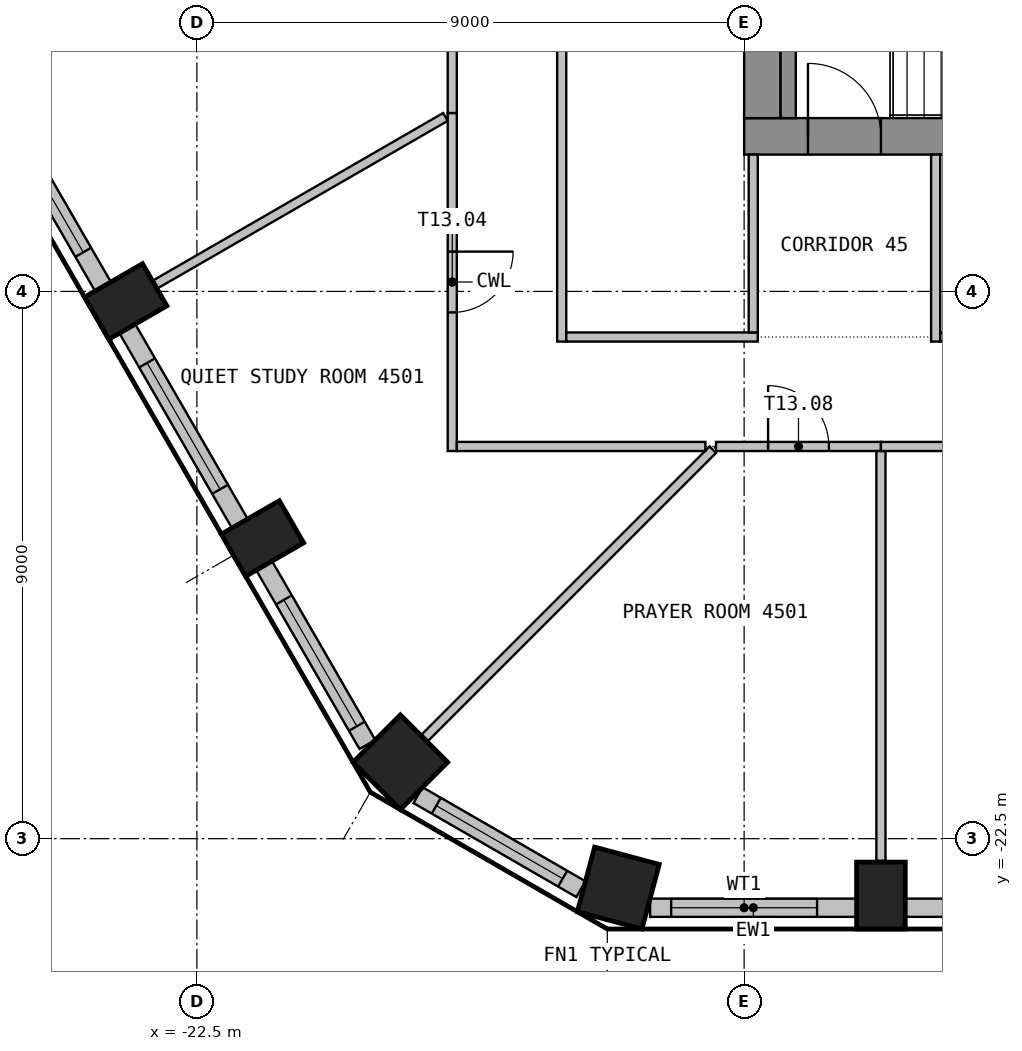
"""IFC4 building model, lengths in metres.
Left out: names, types, materials, properties, quantities, classifications, styles, units other than length and angle.
Written with IfcOpenShell. Run it as: python <this file> out.ifc"""

import sys

from ifc_helpers import new_model, si_unit, direction, frame, frame_2d, origin, origin_2d, place, context, subcontext, project, spatial, rectangle, extrude, element, fill, save


model = new_model("IFC4")
c1 = context("Model", 3, precision=1e-05, world=origin(), true_north=direction((0.0, 1.0)))
c2 = subcontext(c1, "Body", "Model", "MODEL_VIEW")
j1 = project(units=[si_unit("LENGTHUNIT", "METRE"), si_unit("PLANEANGLEUNIT", "RADIAN")], contexts=[c1])
p1 = place(None, origin())
s1 = spatial("IfcSite", under=j1, at=p1, CompositionType="ELEMENT")
p2 = place(p1, origin())
s2 = spatial("IfcBuilding", under=s1, at=p2, CompositionType="ELEMENT")
p3 = place(p2, frame((0.0, 0.0, 183.9)))
s3 = spatial("IfcBuildingStorey", under=s2, at=p3, CompositionType="ELEMENT", Elevation=183.9)
p4 = place(p3, frame((-15.57, -23.312, 0.0), z_axis=(0.0, 0.0, 1.0), x_axis=(0.965925826289, -0.258819045103, 0.0)))
e1 = element("IfcColumn", 1, at=p4, inside=s3, PredefinedType="COLUMN", context=c2, shape_type="SweptSolid", body=[
    extrude(rectangle(XDim=1.1, YDim=1.1, at=origin_2d()), origin(), (0.0, 0.0, 1.0), 3.55),
])
for number, where, z_axis, x_axis in (
    (2, (-11.25, -23.436, 0.0), (0.0, 0.0, 1.0), (1.0, 0.0, 0.0)),
    (3, (-23.671, -13.666, 0.0), (0.0, 0.0, 1.0), (0.5, -0.866, 0.0)),
    (4, (-21.421, -17.563, 0.0), (0.0, 0.0, 1.0), (0.5, -0.866, 0.0)),
):
    element("IfcColumn", number, at=place(p3, frame(where, z_axis=z_axis, x_axis=x_axis)), inside=s3, PredefinedType="COLUMN", context=c2, shape_type="SweptSolid", body=[
        extrude(rectangle(XDim=0.8, YDim=1.1, at=origin_2d()), origin(), (0.0, 0.0, 1.0), 3.55),
    ])
p5 = place(p3, frame((-19.154, -21.242, 0.0), z_axis=(0.0, 0.0, 1.0), x_axis=(0.707106781187, -0.707106781187, 0.0)))
e5 = element("IfcColumn", 5, at=p5, inside=s3, PredefinedType="COLUMN", context=c2, shape_type="SweptSolid", body=[
    extrude(rectangle(XDim=1.1, YDim=1.1, at=origin_2d()), origin(), (0.0, 0.0, 1.0), 3.55),
])
p6 = place(p3, frame((-15.046, -23.635, 0.0), z_axis=(0.0, 0.0, 1.0), x_axis=(1.0, 0.0, 0.0)))
e6 = element("IfcWall", 6, at=p6, inside=s3, PredefinedType="SOLIDWALL", context=c2, shape_type="SweptSolid", body=[
    extrude(rectangle(XDim=3.396, YDim=0.3, at=frame_2d((1.698, 0.0))), origin(), (0.0, 0.0, 1.0), 3.55),
])
p7 = place(p6, frame((0.346, 0.0, 0.9)))
e7 = element("IfcOpeningElement", 7, at=p7, cuts=e6, PredefinedType="OPENING", context=c2, shape_type="SweptSolid", body=[
    extrude(rectangle(XDim=2.4, YDim=2.1, at=frame_2d((1.2, 1.05))), frame((0.0, 0.16, 0.0), z_axis=(0.0, -1.0, 0.0), x_axis=(1.0, 0.0, 0.0)), (0.0, 0.0, 1.0), 0.32),
])
p8 = place(p3, frame((-10.85, -23.635, 0.0), z_axis=(0.0, 0.0, 1.0), x_axis=(1.0, 0.0, 0.0)))
e8 = element("IfcWall", 8, at=p8, inside=s3, PredefinedType="SOLIDWALL", context=c2, shape_type="SweptSolid", body=[
    extrude(rectangle(XDim=3.699, YDim=0.3, at=frame_2d((1.85, 0.0))), origin(), (0.0, 0.0, 1.0), 3.55),
])
p9 = place(p8, frame((0.649, 0.0, 0.9)))
e9 = element("IfcOpeningElement", 9, at=p9, cuts=e8, PredefinedType="OPENING", context=c2, shape_type="SweptSolid", body=[
    extrude(rectangle(XDim=2.4, YDim=2.1, at=frame_2d((1.2, 1.05))), frame((0.0, 0.16, 0.0), z_axis=(0.0, -1.0, 0.0), x_axis=(1.0, 0.0, 0.0)), (0.0, 0.0, 1.0), 0.32),
])
p10 = place(p3, frame((-25.894, -10.216, 0.0), z_axis=(0.0, 0.0, 1.0), x_axis=(0.500029062817, -0.866008623709, 0.0)))
e10 = element("IfcWall", 10, at=p10, inside=s3, PredefinedType="SOLIDWALL", context=c2, shape_type="SweptSolid", body=[
    extrude(rectangle(XDim=3.699, YDim=0.3, at=frame_2d((1.85, 0.0))), origin(), (0.0, 0.0, 1.0), 3.55),
])
p11 = place(p10, frame((0.649, 0.0, 0.9)))
e11 = element("IfcOpeningElement", 11, at=p11, cuts=e10, PredefinedType="OPENING", context=c2, shape_type="SweptSolid", body=[
    extrude(rectangle(XDim=2.4, YDim=2.1, at=frame_2d((1.2, 1.05))), frame((0.0, 0.16, 0.0), z_axis=(0.0, -1.0, 0.0), x_axis=(1.0, 0.0, 0.0)), (0.0, 0.0, 1.0), 0.32),
])
p12 = place(p3, frame((-23.644, -14.113, 0.0), z_axis=(0.0, 0.0, 1.0), x_axis=(0.500029062817, -0.866008623709, 0.0)))
e12 = element("IfcWall", 12, at=p12, inside=s3, PredefinedType="SOLIDWALL", context=c2, shape_type="SweptSolid", body=[
    extrude(rectangle(XDim=3.699, YDim=0.3, at=frame_2d((1.85, 0.0))), origin(), (0.0, 0.0, 1.0), 3.55),
])
p13 = place(p12, frame((0.649, 0.0, 0.9)))
e13 = element("IfcOpeningElement", 13, at=p13, cuts=e12, PredefinedType="OPENING", context=c2, shape_type="SweptSolid", body=[
    extrude(rectangle(XDim=2.4, YDim=2.1, at=frame_2d((1.2, 1.05))), frame((0.0, 0.16, 0.0), z_axis=(0.0, -1.0, 0.0), x_axis=(1.0, 0.0, 0.0)), (0.0, 0.0, 1.0), 0.32),
])
p14 = place(p3, frame((-21.394, -18.01, 0.0), z_axis=(0.0, 0.0, 1.0), x_axis=(0.500012868213, -0.866017974191, 0.0)))
e14 = element("IfcWall", 14, at=p14, inside=s3, PredefinedType="SOLIDWALL", context=c2, shape_type="SweptSolid", body=[
    extrude(rectangle(XDim=3.396, YDim=0.3, at=frame_2d((1.698, 0.0))), origin(), (0.0, 0.0, 1.0), 3.55),
])
p15 = place(p14, frame((0.649, 0.0, 0.9)))
e15 = element("IfcOpeningElement", 15, at=p15, cuts=e14, PredefinedType="OPENING", context=c2, shape_type="SweptSolid", body=[
    extrude(rectangle(XDim=2.4, YDim=2.1, at=frame_2d((1.2, 1.05))), frame((0.0, 0.16, 0.0), z_axis=(0.0, -1.0, 0.0), x_axis=(1.0, 0.0, 0.0)), (0.0, 0.0, 1.0), 0.32),
])
p16 = place(p3, frame((-18.863, -21.784, 0.0), z_axis=(0.0, 0.0, 1.0), x_axis=(0.865994975416, -0.500052699777, 0.0)))
e16 = element("IfcWall", 16, at=p16, inside=s3, PredefinedType="SOLIDWALL", context=c2, shape_type="SweptSolid", body=[
    extrude(rectangle(XDim=3.093, YDim=0.3, at=frame_2d((1.546, 0.0))), origin(), (0.0, 0.0, 1.0), 3.55),
])
p17 = place(p16, frame((0.346, 0.0, 0.9)))
e17 = element("IfcOpeningElement", 17, at=p17, cuts=e16, PredefinedType="OPENING", context=c2, shape_type="SweptSolid", body=[
    extrude(rectangle(XDim=2.4, YDim=2.1, at=frame_2d((1.2, 1.05))), frame((0.0, 0.16, 0.0), z_axis=(0.0, -1.0, 0.0), x_axis=(1.0, 0.0, 0.0)), (0.0, 0.0, 1.0), 0.32),
])
p18 = place(p3, frame((-13.5, -10.95, 0.0), z_axis=(0.0, 0.0, 1.0), x_axis=(1.0, 0.0, 0.0)))
e18 = element("IfcWall", 18, at=p18, inside=s3, PredefinedType="SHEAR", context=c2, shape_type="SweptSolid", body=[
    extrude(rectangle(XDim=27.0, YDim=0.6, at=frame_2d((13.5, 0.0))), origin(), (0.0, 0.0, 1.0), 3.55),
])
p19 = place(p18, frame((12.3, 0.0, 0.0)))
e19 = element("IfcOpeningElement", 19, at=p19, cuts=e18, PredefinedType="OPENING", context=c2, shape_type="SweptSolid", body=[
    extrude(rectangle(XDim=2.4, YDim=2.1, at=frame_2d((1.2, 1.05))), frame((0.0, 0.31, 0.0), z_axis=(0.0, -1.0, 0.0), x_axis=(1.0, 0.0, 0.0)), (0.0, 0.0, 1.0), 0.62),
])
p20 = place(p18, frame((1.05, 0.0, 0.0)))
e20 = element("IfcOpeningElement", 20, at=p20, cuts=e18, PredefinedType="OPENING", context=c2, shape_type="SweptSolid", body=[
    extrude(rectangle(XDim=1.2, YDim=2.1, at=frame_2d((0.6, 1.05))), frame((0.0, 0.31, 0.0), z_axis=(0.0, -1.0, 0.0), x_axis=(1.0, 0.0, 0.0)), (0.0, 0.0, 1.0), 0.62),
])
p21 = place(p18, frame((24.75, 0.0, 0.0)))
e21 = element("IfcOpeningElement", 21, at=p21, cuts=e18, PredefinedType="OPENING", context=c2, shape_type="SweptSolid", body=[
    extrude(rectangle(XDim=1.2, YDim=2.1, at=frame_2d((0.6, 1.05))), frame((0.0, 0.31, 0.0), z_axis=(0.0, -1.0, 0.0), x_axis=(1.0, 0.0, 0.0)), (0.0, 0.0, 1.0), 0.62),
])
p22 = place(p3, frame((-13.2, -10.65, 0.0), z_axis=(0.0, 0.0, 1.0), x_axis=(0.0, 1.0, 0.0)))
e22 = element("IfcWall", 22, at=p22, inside=s3, PredefinedType="SHEAR", context=c2, shape_type="SweptSolid", body=[
    extrude(rectangle(XDim=21.3, YDim=0.6, at=frame_2d((10.65, 0.0))), origin(), (0.0, 0.0, 1.0), 3.55),
])
p23 = place(p22, frame((9.45, 0.0, 0.0)))
e23 = element("IfcOpeningElement", 23, at=p23, cuts=e22, PredefinedType="OPENING", context=c2, shape_type="SweptSolid", body=[
    extrude(rectangle(XDim=2.4, YDim=2.1, at=frame_2d((1.2, 1.05))), frame((0.0, 0.31, 0.0), z_axis=(0.0, -1.0, 0.0), x_axis=(1.0, 0.0, 0.0)), (0.0, 0.0, 1.0), 0.62),
])
p24 = place(p3, frame((-12.775, -10.65, 0.0), z_axis=(0.0, 0.0, 1.0), x_axis=(0.0, 1.0, 0.0)))
e24 = element("IfcWall", 24, at=p24, inside=s3, PredefinedType="SHEAR", context=c2, shape_type="SweptSolid", body=[
    extrude(rectangle(XDim=3.25, YDim=0.25, at=frame_2d((1.625, 0.0))), origin(), (0.0, 0.0, 1.0), 3.55),
])
p25 = place(p3, frame((-18.413, -10.631, 0.0), z_axis=(0.0, 0.0, 1.0), x_axis=(-0.866074743691, -0.499914531035, 0.0)))
e25 = element("IfcWall", 25, at=p25, inside=s3, PredefinedType="PARTITIONING", context=c2, shape_type="SweptSolid", body=[
    extrude(rectangle(XDim=5.501, YDim=0.15, at=frame_2d((2.751, 0.0))), origin(), (0.0, 0.0, 1.0), 3.55),
])
p26 = place(p3, frame((-14.015, -16.103, 0.0), z_axis=(0.0, 0.0, 1.0), x_axis=(-0.707052104459, -0.707161453686, 0.0)))
e26 = element("IfcWall", 26, at=p26, inside=s3, PredefinedType="PARTITIONING", context=c2, shape_type="SweptSolid", body=[
    extrude(rectangle(XDim=6.698, YDim=0.15, at=frame_2d((3.349, 0.0))), origin(), (0.0, 0.0, 1.0), 3.55),
])
p27 = place(p3, frame((-18.3, -10.566, 0.0), z_axis=(0.0, 0.0, 1.0), x_axis=(0.0, -1.0, 0.0)))
e27 = element("IfcWall", 27, at=p27, inside=s3, PredefinedType="PARTITIONING", context=c2, shape_type="SweptSolid", body=[
    extrude(rectangle(XDim=5.559, YDim=0.15, at=frame_2d((2.78, 0.0))), origin(), (0.0, 0.0, 1.0), 3.55),
])
p28 = place(p27, frame((2.28, 0.0, 0.0)))
e28 = element("IfcOpeningElement", 28, at=p28, cuts=e27, PredefinedType="OPENING", context=c2, shape_type="SweptSolid", body=[
    extrude(rectangle(XDim=1.0, YDim=2.1, at=frame_2d((0.5, 1.05))), frame((0.0, 0.085, 0.0), z_axis=(0.0, -1.0, 0.0), x_axis=(1.0, 0.0, 0.0)), (0.0, 0.0, 1.0), 0.17),
])
p29 = place(p3, frame((-18.225, -16.05, 0.0), z_axis=(0.0, 0.0, 1.0), x_axis=(1.0, 0.0, 0.0)))
e29 = element("IfcWall", 29, at=p29, inside=s3, PredefinedType="PARTITIONING", context=c2, shape_type="SweptSolid", body=[
    extrude(rectangle(XDim=4.088, YDim=0.15, at=frame_2d((2.044, 0.0))), origin(), (0.0, 0.0, 1.0), 3.55),
])
p30 = place(p3, frame((-18.3, -0.303, 0.0), z_axis=(0.0, 0.0, 1.0), x_axis=(0.0, -1.0, 0.0)))
e30 = element("IfcWall", 30, at=p30, inside=s3, PredefinedType="PARTITIONING", context=c2, shape_type="SweptSolid", body=[
    extrude(rectangle(XDim=10.263, YDim=0.15, at=frame_2d((5.131, 0.0))), origin(), (0.0, 0.0, 1.0), 3.55),
])
p31 = place(p30, frame((4.632, 0.0, 0.0)))
e31 = element("IfcOpeningElement", 31, at=p31, cuts=e30, PredefinedType="OPENING", context=c2, shape_type="SweptSolid", body=[
    extrude(rectangle(XDim=1.0, YDim=2.1, at=frame_2d((0.5, 1.05))), frame((0.0, 0.085, 0.0), z_axis=(0.0, -1.0, 0.0), x_axis=(1.0, 0.0, 0.0)), (0.0, 0.0, 1.0), 0.17),
])
p32 = place(p3, frame((-16.5, -14.325, 0.0), z_axis=(0.0, 0.0, 1.0), x_axis=(0.0, 1.0, 0.0)))
e32 = element("IfcWall", 32, at=p32, inside=s3, PredefinedType="PARTITIONING", context=c2, shape_type="SweptSolid", body=[
    extrude(rectangle(XDim=12.9, YDim=0.15, at=frame_2d((6.45, 0.0))), origin(), (0.0, 0.0, 1.0), 3.55),
])
p33 = place(p32, frame((5.95, 0.0, 0.0)))
e33 = element("IfcOpeningElement", 33, at=p33, cuts=e32, PredefinedType="OPENING", context=c2, shape_type="SweptSolid", body=[
    extrude(rectangle(XDim=1.0, YDim=2.1, at=frame_2d((0.5, 1.05))), frame((0.0, 0.085, 0.0), z_axis=(0.0, -1.0, 0.0), x_axis=(1.0, 0.0, 0.0)), (0.0, 0.0, 1.0), 0.17),
])
p34 = place(p3, frame((-13.275, -14.25, 0.0), z_axis=(0.0, 0.0, 1.0), x_axis=(-1.0, 0.0, 0.0)))
e34 = element("IfcWall", 34, at=p34, inside=s3, PredefinedType="PARTITIONING", context=c2, shape_type="SweptSolid", body=[
    extrude(rectangle(XDim=3.15, YDim=0.15, at=frame_2d((1.575, 0.0))), origin(), (0.0, 0.0, 1.0), 3.55),
])
p35 = place(p3, frame((-13.962, -16.05, 0.0), z_axis=(0.0, 0.0, 1.0), x_axis=(1.0, 0.0, 0.0)))
e35 = element("IfcWall", 35, at=p35, inside=s3, PredefinedType="PARTITIONING", context=c2, shape_type="SweptSolid", body=[
    extrude(rectangle(XDim=2.712, YDim=0.15, at=frame_2d((1.356, 0.0))), origin(), (0.0, 0.0, 1.0), 3.55),
])
p36 = place(p35, frame((0.856, 0.0, 0.0)))
e36 = element("IfcOpeningElement", 36, at=p36, cuts=e35, PredefinedType="OPENING", context=c2, shape_type="SweptSolid", body=[
    extrude(rectangle(XDim=1.0, YDim=2.1, at=frame_2d((0.5, 1.05))), frame((0.0, 0.085, 0.0), z_axis=(0.0, -1.0, 0.0), x_axis=(1.0, 0.0, 0.0)), (0.0, 0.0, 1.0), 0.17),
])
p37 = place(p3, frame((-13.35, -11.25, 0.0), z_axis=(0.0, 0.0, 1.0), x_axis=(0.0, -1.0, 0.0)))
e37 = element("IfcWall", 37, at=p37, inside=s3, PredefinedType="PARTITIONING", context=c2, shape_type="SweptSolid", body=[
    extrude(rectangle(XDim=2.925, YDim=0.15, at=frame_2d((1.462, 0.0))), origin(), (0.0, 0.0, 1.0), 3.55),
])
p38 = place(p3, frame((-11.25, -16.125, 0.0), z_axis=(0.0, 0.0, 1.0), x_axis=(0.0, -1.0, 0.0)))
e38 = element("IfcWall", 38, at=p38, inside=s3, PredefinedType="PARTITIONING", context=c2, shape_type="SweptSolid", body=[
    extrude(rectangle(XDim=6.74, YDim=0.15, at=frame_2d((3.37, 0.0))), origin(), (0.0, 0.0, 1.0), 3.55),
])
p39 = place(p3, frame((-11.25, -16.05, 0.0), z_axis=(0.0, 0.0, 1.0), x_axis=(1.0, 0.0, 0.0)))
e39 = element("IfcWall", 39, at=p39, inside=s3, PredefinedType="PARTITIONING", context=c2, shape_type="SweptSolid", body=[
    extrude(rectangle(XDim=18.0, YDim=0.15, at=frame_2d((9.0, 0.0))), origin(), (0.0, 0.0, 1.0), 3.55),
])
p40 = place(p39, frame((8.5, 0.0, 0.0)))
e40 = element("IfcOpeningElement", 40, at=p40, cuts=e39, PredefinedType="OPENING", context=c2, shape_type="SweptSolid", body=[
    extrude(rectangle(XDim=1.0, YDim=2.1, at=frame_2d((0.5, 1.05))), frame((0.0, 0.085, 0.0), z_axis=(0.0, -1.0, 0.0), x_axis=(1.0, 0.0, 0.0)), (0.0, 0.0, 1.0), 0.17),
])
p41 = place(p3, frame((-10.35, -14.325, 0.0), z_axis=(0.0, 0.0, 1.0), x_axis=(0.0, 1.0, 0.0)))
e41 = element("IfcWall", 41, at=p41, inside=s3, PredefinedType="PARTITIONING", context=c2, shape_type="SweptSolid", body=[
    extrude(rectangle(XDim=3.075, YDim=0.15, at=frame_2d((1.538, 0.0))), origin(), (0.0, 0.0, 1.0), 3.55),
])
p42 = place(p3, frame((-1.425, -14.25, 0.0), z_axis=(0.0, 0.0, 1.0), x_axis=(-1.0, 0.0, 0.0)))
e42 = element("IfcWall", 42, at=p42, inside=s3, PredefinedType="PARTITIONING", context=c2, shape_type="SweptSolid", body=[
    extrude(rectangle(XDim=8.85, YDim=0.15, at=frame_2d((4.425, 0.0))), origin(), (0.0, 0.0, 1.0), 3.55),
])
p43 = place(p42, frame((3.925, 0.0, 0.0)))
e43 = element("IfcOpeningElement", 43, at=p43, cuts=e42, PredefinedType="OPENING", context=c2, shape_type="SweptSolid", body=[
    extrude(rectangle(XDim=1.0, YDim=2.1, at=frame_2d((0.5, 1.05))), frame((0.0, 0.085, 0.0), z_axis=(0.0, -1.0, 0.0), x_axis=(1.0, 0.0, 0.0)), (0.0, 0.0, 1.0), 0.17),
])
p44 = place(p7, origin())
e44 = element("IfcWindow", 44, at=p44, inside=s3, PartitioningType="SINGLE_PANEL", PredefinedType="WINDOW", context=c2, shape_type="SweptSolid", body=[
    extrude(rectangle(XDim=2.4, YDim=2.1, at=frame_2d((1.2, 1.05))), frame((0.0, 0.03, 0.0), z_axis=(0.0, -1.0, 0.0), x_axis=(1.0, 0.0, 0.0)), (0.0, 0.0, 1.0), 0.06),
])
fill(e7, e44)
p45 = place(p11, origin())
e45 = element("IfcWindow", 45, at=p45, inside=s3, PartitioningType="SINGLE_PANEL", PredefinedType="WINDOW", context=c2, shape_type="SweptSolid", body=[
    extrude(rectangle(XDim=2.4, YDim=2.1, at=frame_2d((1.2, 1.05))), frame((0.0, 0.03, 0.0), z_axis=(0.0, -1.0, 0.0), x_axis=(1.0, 0.0, 0.0)), (0.0, 0.0, 1.0), 0.06),
])
fill(e11, e45)
p46 = place(p13, origin())
e46 = element("IfcWindow", 46, at=p46, inside=s3, PartitioningType="SINGLE_PANEL", PredefinedType="WINDOW", context=c2, shape_type="SweptSolid", body=[
    extrude(rectangle(XDim=2.4, YDim=2.1, at=frame_2d((1.2, 1.05))), frame((0.0, 0.03, 0.0), z_axis=(0.0, -1.0, 0.0), x_axis=(1.0, 0.0, 0.0)), (0.0, 0.0, 1.0), 0.06),
])
fill(e13, e46)
p47 = place(p15, origin())
e47 = element("IfcWindow", 47, at=p47, inside=s3, PartitioningType="SINGLE_PANEL", PredefinedType="WINDOW", context=c2, shape_type="SweptSolid", body=[
    extrude(rectangle(XDim=2.4, YDim=2.1, at=frame_2d((1.2, 1.05))), frame((0.0, 0.03, 0.0), z_axis=(0.0, -1.0, 0.0), x_axis=(1.0, 0.0, 0.0)), (0.0, 0.0, 1.0), 0.06),
])
fill(e15, e47)
p48 = place(p17, origin())
e48 = element("IfcWindow", 48, at=p48, inside=s3, PartitioningType="SINGLE_PANEL", PredefinedType="WINDOW", context=c2, shape_type="SweptSolid", body=[
    extrude(rectangle(XDim=2.4, YDim=2.1, at=frame_2d((1.2, 1.05))), frame((0.0, 0.03, 0.0), z_axis=(0.0, -1.0, 0.0), x_axis=(1.0, 0.0, 0.0)), (0.0, 0.0, 1.0), 0.06),
])
fill(e17, e48)
p49 = place(p20, origin())
e49 = element("IfcDoor", 49, at=p49, inside=s3, OperationType="SINGLE_SWING_RIGHT", PredefinedType="DOOR", context=c2, shape_type="SweptSolid", body=[
    extrude(rectangle(XDim=1.2, YDim=2.1, at=frame_2d((0.6, 1.05))), frame((0.0, 0.025, 0.0), z_axis=(0.0, -1.0, 0.0), x_axis=(1.0, 0.0, 0.0)), (0.0, 0.0, 1.0), 0.05),
])
fill(e20, e49)
p50 = place(p28, origin())
e50 = element("IfcDoor", 50, at=p50, inside=s3, OperationType="SINGLE_SWING_RIGHT", PredefinedType="DOOR", context=c2, shape_type="SweptSolid", body=[
    extrude(rectangle(XDim=1.0, YDim=2.1, at=frame_2d((0.5, 1.05))), frame((0.0, 0.025, 0.0), z_axis=(0.0, -1.0, 0.0), x_axis=(1.0, 0.0, 0.0)), (0.0, 0.0, 1.0), 0.05),
])
fill(e28, e50)
p51 = place(p36, origin())
e51 = element("IfcDoor", 51, at=p51, inside=s3, OperationType="SINGLE_SWING_LEFT", PredefinedType="DOOR", context=c2, shape_type="SweptSolid", body=[
    extrude(rectangle(XDim=1.0, YDim=2.1, at=frame_2d((0.5, 1.05))), frame((0.0, 0.025, 0.0), z_axis=(0.0, -1.0, 0.0), x_axis=(1.0, 0.0, 0.0)), (0.0, 0.0, 1.0), 0.05),
])
fill(e36, e51)
save(model, sys.argv[1])
